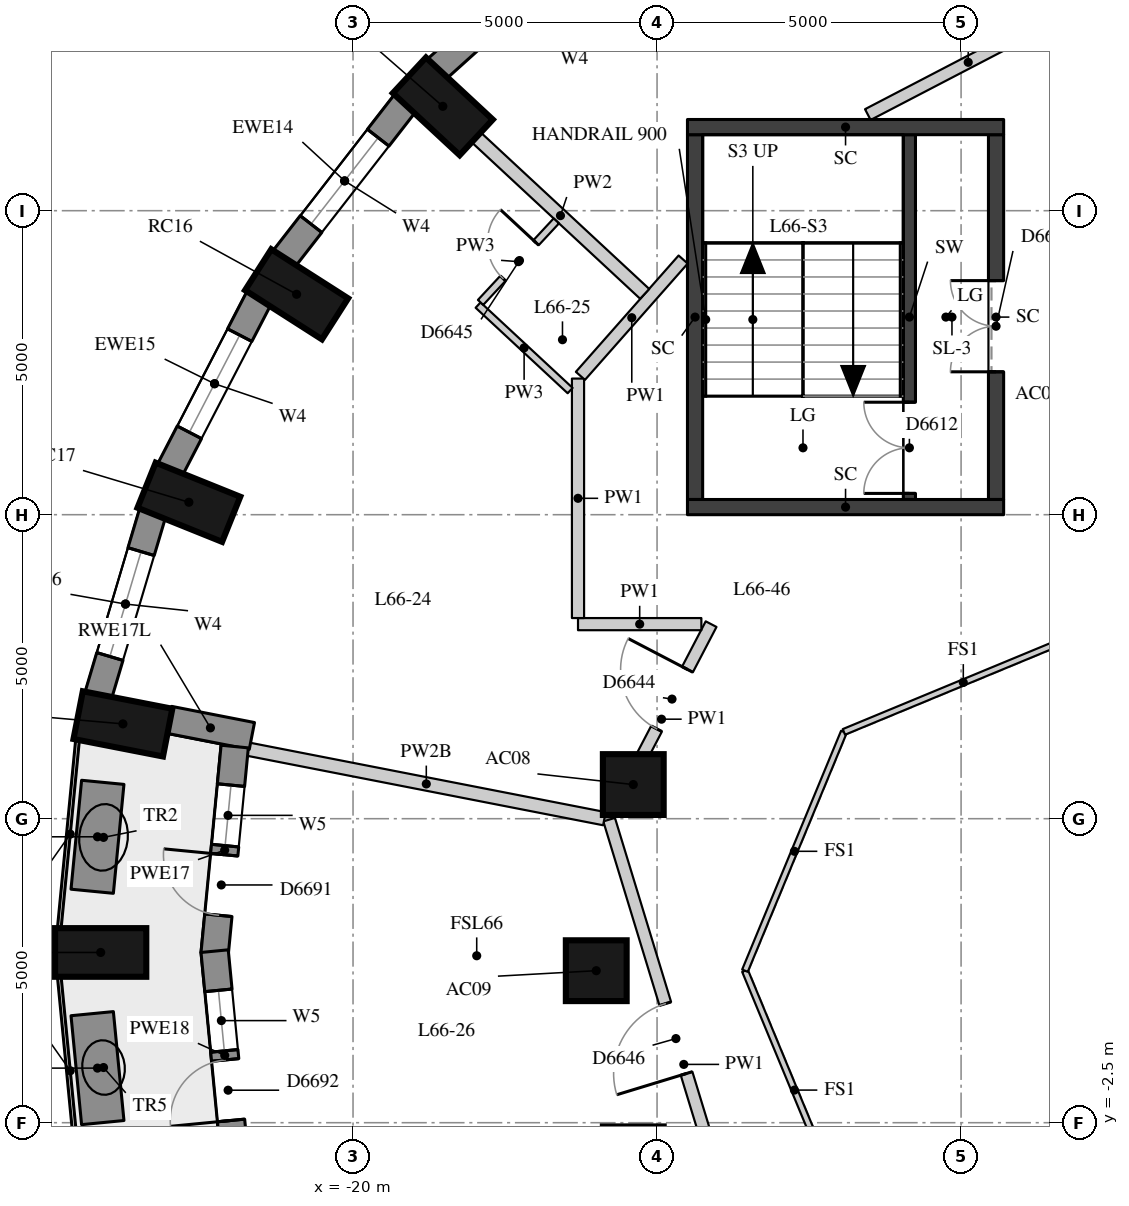
"""IFC4 building model, lengths in metres.
Left out: names, types, materials, properties, quantities, classifications, styles, units other than length and angle.
Written with IfcOpenShell. Run it as: python <this file> out.ifc"""

import sys

from ifc_helpers import new_model, si_unit, direction, frame, frame_2d, origin, origin_2d, place, context, subcontext, project, spatial, rectangle, extrude, element, fill, save


model = new_model("IFC4")
c1 = context("Model", 3, precision=1e-05, world=origin(), true_north=direction((0.0, 1.0)))
c2 = subcontext(c1, "Body", "Model", "MODEL_VIEW")
j1 = project(units=[si_unit("LENGTHUNIT", "METRE"), si_unit("PLANEANGLEUNIT", "RADIAN")], contexts=[c1])
p1 = place(None, origin())
s1 = spatial("IfcSite", under=j1, at=p1, CompositionType="ELEMENT")
p2 = place(p1, origin())
s2 = spatial("IfcBuilding", under=s1, at=p2, CompositionType="ELEMENT")
p3 = place(p2, frame((0.0, 0.0, 233.3)))
s3 = spatial("IfcBuildingStorey", under=s2, at=p3, CompositionType="ELEMENT", Elevation=233.3)
for number, where, z_axis, x_axis in (
    (1, (-18.523, 14.216, 0.0), (0.0, 0.0, 1.0), (-0.733, 0.681, 0.0)),
    (2, (-20.928, 11.125, 0.0), (0.0, 0.0, 1.0), (-0.843, 0.539, 0.0)),
    (3, (-22.7, 7.705, 0.0), (0.0, 0.0, 1.0), (-0.928, 0.374, 0.0)),
    (4, (-23.785, 4.06, 0.0), (0.0, 0.0, 1.0), (-0.981, 0.192, 0.0)),
    (5, (-24.15, 0.3, 0.0), (0.0, 0.0, 1.0), (-1.0, 0.0, 0.0)),
):
    element("IfcColumn", number, at=place(p3, frame(where, z_axis=z_axis, x_axis=x_axis)), inside=s3, PredefinedType="COLUMN", context=c2, shape_type="SweptSolid", body=[
        extrude(rectangle(XDim=1.5, YDim=0.8, at=origin_2d()), origin(), (0.0, 0.0, 1.0), 3.3),
    ])
for number, where, z_axis, x_axis in (
    (6, (-15.391, 3.062, 0.0), (0.0, 0.0, 1.0), (1.0, 0.0, 0.0)),
    (7, (-16.0, 0.0, 0.0), (0.0, 0.0, 1.0), (1.0, 0.0, 0.0)),
    (8, (-15.391, -3.062, 0.0), (0.0, 0.0, 1.0), (1.0, 0.0, 0.0)),
):
    element("IfcColumn", number, at=place(p3, frame(where, z_axis=z_axis, x_axis=x_axis)), inside=s3, PredefinedType="COLUMN", context=c2, shape_type="SweptSolid", body=[
        extrude(rectangle(XDim=1.0, YDim=1.0, at=origin_2d()), origin(), (0.0, 0.0, 1.0), 3.3),
    ])
p4 = place(p3, frame((-16.159, 17.047, 0.0), z_axis=(0.0, 0.0, 1.0), x_axis=(-0.743166014219, -0.669107073128, 0.0)))
e9 = element("IfcWall", 9, at=p4, inside=s3, PredefinedType="SOLIDWALL", context=c2, shape_type="SweptSolid", body=[
    extrude(rectangle(XDim=3.316, YDim=0.45, at=frame_2d((1.658, 0.0))), origin(), (0.0, 0.0, 1.0), 3.02),
])
p5 = place(p4, frame((0.758, 0.0, 0.4)))
e10 = element("IfcOpeningElement", 10, at=p5, cuts=e9, PredefinedType="OPENING", context=c2, shape_type="SweptSolid", body=[
    extrude(rectangle(XDim=1.8, YDim=1.75, at=frame_2d((0.9, 0.875))), frame((0.0, 0.235, 0.0), z_axis=(0.0, -1.0, 0.0), x_axis=(1.0, 0.0, 0.0)), (0.0, 0.0, 1.0), 0.47),
])
p6 = place(p3, frame((-19.142, 14.272, 0.0), z_axis=(0.0, 0.0, 1.0), x_axis=(-0.613862536705, -0.789412937587, 0.0)))
e11 = element("IfcWall", 11, at=p6, inside=s3, PredefinedType="SOLIDWALL", context=c2, shape_type="SweptSolid", body=[
    extrude(rectangle(XDim=3.247, YDim=0.45, at=frame_2d((1.624, 0.0))), origin(), (0.0, 0.0, 1.0), 3.02),
])
p7 = place(p6, frame((0.724, 0.0, 0.4)))
e12 = element("IfcOpeningElement", 12, at=p7, cuts=e11, PredefinedType="OPENING", context=c2, shape_type="SweptSolid", body=[
    extrude(rectangle(XDim=1.8, YDim=1.75, at=frame_2d((0.9, 0.875))), frame((0.0, 0.235, 0.0), z_axis=(0.0, -1.0, 0.0), x_axis=(1.0, 0.0, 0.0)), (0.0, 0.0, 1.0), 0.47),
])
p8 = place(p3, frame((-21.545, 11.068, 0.0), z_axis=(0.0, 0.0, 1.0), x_axis=(-0.459889857669, -0.887975967475, 0.0)))
e13 = element("IfcWall", 13, at=p8, inside=s3, PredefinedType="SOLIDWALL", context=c2, shape_type="SweptSolid", body=[
    extrude(rectangle(XDim=3.186, YDim=0.45, at=frame_2d((1.593, 0.0))), origin(), (0.0, 0.0, 1.0), 3.02),
])
p9 = place(p8, frame((0.693, 0.0, 0.4)))
e14 = element("IfcOpeningElement", 14, at=p9, cuts=e13, PredefinedType="OPENING", context=c2, shape_type="SweptSolid", body=[
    extrude(rectangle(XDim=1.8, YDim=1.75, at=frame_2d((0.9, 0.875))), frame((0.0, 0.235, 0.0), z_axis=(0.0, -1.0, 0.0), x_axis=(1.0, 0.0, 0.0)), (0.0, 0.0, 1.0), 0.47),
])
p10 = place(p3, frame((-23.294, 7.535, 0.0), z_axis=(0.0, 0.0, 1.0), x_axis=(-0.285263800865, -0.958449040855, 0.0)))
e15 = element("IfcWall", 15, at=p10, inside=s3, PredefinedType="SOLIDWALL", context=c2, shape_type="SweptSolid", body=[
    extrude(rectangle(XDim=3.139, YDim=0.45, at=frame_2d((1.57, 0.0))), origin(), (0.0, 0.0, 1.0), 3.02),
])
p11 = place(p10, frame((0.67, 0.0, 0.4)))
e16 = element("IfcOpeningElement", 16, at=p11, cuts=e15, PredefinedType="OPENING", context=c2, shape_type="SweptSolid", body=[
    extrude(rectangle(XDim=1.8, YDim=1.75, at=frame_2d((0.9, 0.875))), frame((0.0, 0.235, 0.0), z_axis=(0.0, -1.0, 0.0), x_axis=(1.0, 0.0, 0.0)), (0.0, 0.0, 1.0), 0.47),
])
p12 = place(p3, frame((-23.028, 4.127, 0.0), z_axis=(0.0, 0.0, 1.0), x_axis=(0.981468844755, -0.191621780535, 0.0)))
e17 = element("IfcWall", 17, at=p12, inside=s3, PredefinedType="SOLIDWALL", context=c2, shape_type="SweptSolid", body=[
    extrude(rectangle(XDim=1.39, YDim=0.45, at=frame_2d((0.695, 0.0))), origin(), (0.0, 0.0, 1.0), 2.57),
])
p13 = place(p3, frame((-21.946, 3.687, 0.0), z_axis=(0.0, 0.0, 1.0), x_axis=(-0.096467747711, -0.995336110895, 0.0)))
e18 = element("IfcWall", 18, at=p13, inside=s3, PredefinedType="SOLIDWALL", context=c2, shape_type="SweptSolid", body=[
    extrude(rectangle(XDim=3.424, YDim=0.45, at=frame_2d((1.712, 0.0))), origin(), (0.0, 0.0, 1.0), 3.02),
])
p14 = place(p13, frame((0.637, 0.0, 0.4)))
e19 = element("IfcOpeningElement", 19, at=p14, cuts=e18, PredefinedType="OPENING", context=c2, shape_type="SweptSolid", body=[
    extrude(rectangle(XDim=1.0, YDim=1.75, at=frame_2d((0.5, 0.875))), frame((0.0, 0.235, 0.0), z_axis=(0.0, -1.0, 0.0), x_axis=(1.0, 0.0, 0.0)), (0.0, 0.0, 1.0), 0.47),
])
p15 = place(p13, frame((1.787, 0.0, 0.0)))
e20 = element("IfcOpeningElement", 20, at=p15, cuts=e18, PredefinedType="OPENING", context=c2, shape_type="SweptSolid", body=[
    extrude(rectangle(XDim=1.0, YDim=2.15, at=frame_2d((0.5, 1.075))), frame((0.0, 0.235, 0.0), z_axis=(0.0, -1.0, 0.0), x_axis=(1.0, 0.0, 0.0)), (0.0, 0.0, 1.0), 0.47),
])
p16 = place(p3, frame((-22.276, 0.322, 0.0), z_axis=(0.0, 0.0, 1.0), x_axis=(0.096423819494, -0.995340367429, 0.0)))
e21 = element("IfcWall", 21, at=p16, inside=s3, PredefinedType="SOLIDWALL", context=c2, shape_type="SweptSolid", body=[
    extrude(rectangle(XDim=3.446, YDim=0.45, at=frame_2d((1.723, 0.0))), origin(), (0.0, 0.0, 1.0), 3.02),
])
p17 = place(p16, frame((0.648, 0.0, 0.4)))
e22 = element("IfcOpeningElement", 22, at=p17, cuts=e21, PredefinedType="OPENING", context=c2, shape_type="SweptSolid", body=[
    extrude(rectangle(XDim=1.0, YDim=1.75, at=frame_2d((0.5, 0.875))), frame((0.0, 0.235, 0.0), z_axis=(0.0, -1.0, 0.0), x_axis=(1.0, 0.0, 0.0)), (0.0, 0.0, 1.0), 0.47),
])
p18 = place(p16, frame((1.798, 0.0, 0.0)))
e23 = element("IfcOpeningElement", 23, at=p18, cuts=e21, PredefinedType="OPENING", context=c2, shape_type="SweptSolid", body=[
    extrude(rectangle(XDim=1.0, YDim=2.15, at=frame_2d((0.5, 1.075))), frame((0.0, 0.235, 0.0), z_axis=(0.0, -1.0, 0.0), x_axis=(1.0, 0.0, 0.0)), (0.0, 0.0, 1.0), 0.47),
])
for number, where, z_axis, x_axis in (
    (24, (-24.116, 3.098, 0.0), (0.0, 0.0, 1.0), (-0.097, -0.995, 0.0)),
    (25, (-24.29, -0.707, 0.0), (0.0, 0.0, 1.0), (0.097, -0.995, 0.0)),
):
    element("IfcWall", number, at=place(p3, frame(where, z_axis=z_axis, x_axis=x_axis)), inside=s3, PredefinedType="USERDEFINED", context=c2, shape_type="SweptSolid", body=[
        extrude(rectangle(XDim=1.8, YDim=0.7, at=frame_2d((0.9, 0.0))), origin(), (0.0, 0.0, 1.0), 0.75),
    ])
p19 = place(p3, frame((-10.85, 7.75, 0.0), z_axis=(0.0, 0.0, 1.0), x_axis=(0.0, 1.0, 0.0)))
e26 = element("IfcWall", 26, at=p19, inside=s3, PredefinedType="SHEAR", context=c2, shape_type="SweptSolid", body=[
    extrude(rectangle(XDim=6.0, YDim=0.2, at=frame_2d((3.0, 0.0))), origin(), (0.0, 0.0, 1.0), 3.02),
])
p20 = place(p19, frame((0.1, 0.0, 0.0)))
e27 = element("IfcOpeningElement", 27, at=p20, cuts=e26, PredefinedType="OPENING", context=c2, shape_type="SweptSolid", body=[
    extrude(rectangle(XDim=1.5, YDim=2.1, at=frame_2d((0.75, 1.05))), frame((0.0, 0.11, 0.0), z_axis=(0.0, -1.0, 0.0), x_axis=(1.0, 0.0, 0.0)), (0.0, 0.0, 1.0), 0.22),
])
p21 = place(p3, frame((-14.375, 7.75, -0.28), z_axis=(0.0, 0.0, 1.0), x_axis=(0.0, 1.0, 0.0)))
e28 = element("IfcWall", 28, at=p21, inside=s3, PredefinedType="SHEAR", context=c2, shape_type="SweptSolid", body=[
    extrude(rectangle(XDim=6.0, YDim=0.25, at=frame_2d((3.0, 0.0))), origin(), (0.0, 0.0, 1.0), 3.3),
])
p22 = place(p3, frame((-9.425, 7.75, -0.28), z_axis=(0.0, 0.0, 1.0), x_axis=(0.0, 1.0, 0.0)))
e29 = element("IfcWall", 29, at=p22, inside=s3, PredefinedType="SHEAR", context=c2, shape_type="SweptSolid", body=[
    extrude(rectangle(XDim=6.0, YDim=0.25, at=frame_2d((3.0, 0.0))), origin(), (0.0, 0.0, 1.0), 3.3),
])
p23 = place(p22, frame((2.1, 0.0, 0.28)))
e30 = element("IfcOpeningElement", 30, at=p23, cuts=e29, PredefinedType="OPENING", context=c2, shape_type="SweptSolid", body=[
    extrude(rectangle(XDim=1.5, YDim=2.1, at=frame_2d((0.75, 1.05))), frame((0.0, 0.135, 0.0), z_axis=(0.0, -1.0, 0.0), x_axis=(1.0, 0.0, 0.0)), (0.0, 0.0, 1.0), 0.27),
])
for number, where, z_axis, x_axis in (
    (31, (-14.5, 13.875, -0.28), (0.0, 0.0, 1.0), (1.0, 0.0, 0.0)),
    (32, (-14.5, 7.625, -0.28), (0.0, 0.0, 1.0), (1.0, 0.0, 0.0)),
):
    element("IfcWall", number, at=place(p3, frame(where, z_axis=z_axis, x_axis=x_axis)), inside=s3, PredefinedType="SHEAR", context=c2, shape_type="SweptSolid", body=[
        extrude(rectangle(XDim=5.2, YDim=0.25, at=frame_2d((2.6, 0.0))), origin(), (0.0, 0.0, 1.0), 3.3),
    ])
p24 = place(p3, frame((-11.534, 14.081, 0.0), z_axis=(0.0, 0.0, 1.0), x_axis=(0.886975089277, 0.461817270143, 0.0)))
e33 = element("IfcWall", 33, at=p24, inside=s3, PredefinedType="PARTITIONING", context=c2, shape_type="SweptSolid", body=[
    extrude(rectangle(XDim=3.723, YDim=0.2, at=frame_2d((1.861, 0.0))), origin(), (0.0, 0.0, 1.0), 3.02),
])
p25 = place(p3, frame((-13.333, -5.567, 0.0), z_axis=(0.0, 0.0, 1.0), x_axis=(-0.291732883234, 0.956499830026, 0.0)))
e34 = element("IfcWall", 34, at=p25, inside=s3, PredefinedType="PARTITIONING", context=c2, shape_type="SweptSolid", body=[
    extrude(rectangle(XDim=8.417, YDim=0.2, at=frame_2d((4.208, 0.0))), origin(), (0.0, 0.0, 1.0), 3.02),
])
p26 = place(p25, frame((4.053, 0.0, 0.0)))
e35 = element("IfcOpeningElement", 35, at=p26, cuts=e34, PredefinedType="OPENING", context=c2, shape_type="SweptSolid", body=[
    extrude(rectangle(XDim=1.2, YDim=2.1, at=frame_2d((0.6, 1.05))), frame((0.0, 0.11, 0.0), z_axis=(0.0, -1.0, 0.0), x_axis=(1.0, 0.0, 0.0)), (0.0, 0.0, 1.0), 0.22),
])
p27 = place(p3, frame((-15.742, 2.573, 0.0), z_axis=(0.0, 0.0, 1.0), x_axis=(0.462435860297, 0.886652736482, 0.0)))
e36 = element("IfcWall", 36, at=p27, inside=s3, PredefinedType="PARTITIONING", context=c2, shape_type="SweptSolid", body=[
    extrude(rectangle(XDim=3.526, YDim=0.2, at=frame_2d((1.763, 0.0))), origin(), (0.0, 0.0, 1.0), 3.02),
])
p28 = place(p27, frame((1.586, 0.0, 0.0)))
e37 = element("IfcOpeningElement", 37, at=p28, cuts=e36, PredefinedType="OPENING", context=c2, shape_type="SweptSolid", body=[
    extrude(rectangle(XDim=1.1, YDim=2.1, at=frame_2d((0.55, 1.05))), frame((0.0, 0.11, 0.0), z_axis=(0.0, -1.0, 0.0), x_axis=(1.0, 0.0, 0.0)), (0.0, 0.0, 1.0), 0.22),
])
p29 = place(p3, frame((-14.271, 5.7, 0.0), z_axis=(0.0, 0.0, 1.0), x_axis=(-1.0, 0.0, 0.0)))
e38 = element("IfcWall", 38, at=p29, inside=s3, PredefinedType="PARTITIONING", context=c2, shape_type="SweptSolid", body=[
    extrude(rectangle(XDim=2.029, YDim=0.2, at=frame_2d((1.014, 0.0))), origin(), (0.0, 0.0, 1.0), 3.02),
])
p30 = place(p3, frame((-16.3, 5.8, 0.0), z_axis=(0.0, 0.0, 1.0), x_axis=(0.0, 1.0, 0.0)))
e39 = element("IfcWall", 39, at=p30, inside=s3, PredefinedType="PARTITIONING", context=c2, shape_type="SweptSolid", body=[
    extrude(rectangle(XDim=3.939, YDim=0.2, at=frame_2d((1.969, 0.0))), origin(), (0.0, 0.0, 1.0), 3.02),
])
p31 = place(p3, frame((-16.26, 9.783, 0.0), z_axis=(0.0, 0.0, 1.0), x_axis=(0.66199168739, 0.74951117792, 0.0)))
e40 = element("IfcWall", 40, at=p31, inside=s3, PredefinedType="PARTITIONING", context=c2, shape_type="SweptSolid", body=[
    extrude(rectangle(XDim=2.552, YDim=0.2, at=frame_2d((1.276, 0.0))), origin(), (0.0, 0.0, 1.0), 3.02),
])
p32 = place(p3, frame((-17.974, 13.706, 0.0), z_axis=(0.0, 0.0, 1.0), x_axis=(0.732644022802, -0.680612030346, 0.0)))
e41 = element("IfcWall", 41, at=p32, inside=s3, PredefinedType="PARTITIONING", context=c2, shape_type="SweptSolid", body=[
    extrude(rectangle(XDim=3.782, YDim=0.22, at=frame_2d((1.891, 0.0))), origin(), (0.0, 0.0, 1.0), 3.02),
])
p33 = place(p3, frame((-21.724, 3.643, 0.0), z_axis=(0.0, 0.0, 1.0), x_axis=(0.981479525595, -0.191567066159, 0.0)))
e42 = element("IfcWall", 42, at=p33, inside=s3, PredefinedType="PARTITIONING", context=c2, shape_type="SweptSolid", body=[
    extrude(rectangle(XDim=5.968, YDim=0.22, at=frame_2d((2.984, 0.0))), origin(), (0.0, 0.0, 1.0), 2.57),
])
p34 = place(p3, frame((-16.429, 9.541, 0.0), z_axis=(0.0, 0.0, 1.0), x_axis=(-0.732625124054, 0.680632373315, 0.0)))
e43 = element("IfcWall", 43, at=p34, inside=s3, PredefinedType="PARTITIONING", context=c2, shape_type="SweptSolid", body=[
    extrude(rectangle(XDim=2.066, YDim=0.12, at=frame_2d((1.033, 0.0))), origin(), (0.0, 0.0, 1.0), 3.02),
])
p35 = place(p3, frame((-17.902, 10.991, 0.0), z_axis=(0.0, 0.0, 1.0), x_axis=(0.680681343043, 0.732579626548, 0.0)))
e44 = element("IfcWall", 44, at=p35, inside=s3, PredefinedType="PARTITIONING", context=c2, shape_type="SweptSolid", body=[
    extrude(rectangle(XDim=1.83, YDim=0.12, at=frame_2d((0.915, 0.0))), origin(), (0.0, 0.0, 1.0), 3.02),
])
p36 = place(p35, frame((0.54, 0.0, 0.0)))
e45 = element("IfcOpeningElement", 45, at=p36, cuts=e44, PredefinedType="OPENING", context=c2, shape_type="SweptSolid", body=[
    extrude(rectangle(XDim=0.8, YDim=2.1, at=frame_2d((0.4, 1.05))), frame((0.0, 0.07, 0.0), z_axis=(0.0, -1.0, 0.0), x_axis=(1.0, 0.0, 0.0)), (0.0, 0.0, 1.0), 0.14),
])
for number, where, z_axis, x_axis in (
    (46, (-11.927, -3.927, 0.0), (0.0, 0.0, 1.0), (-0.383, 0.924, 0.0)),
    (47, (-13.554, 0.0, 0.0), (0.0, 0.0, 1.0), (0.383, 0.924, 0.0)),
    (48, (-11.927, 3.927, 0.0), (0.0, 0.0, 1.0), (0.924, 0.383, 0.0)),
):
    element("IfcWall", number, at=place(p3, frame(where, z_axis=z_axis, x_axis=x_axis)), inside=s3, PredefinedType="PARTITIONING", context=c2, shape_type="SweptSolid", body=[
        extrude(rectangle(XDim=4.251, YDim=0.1, at=frame_2d((2.125, 0.0))), origin(), (0.0, 0.0, 1.0), 3.02),
    ])
p37 = place(p7, origin())
e49 = element("IfcWindow", 49, at=p37, inside=s3, PartitioningType="SINGLE_PANEL", PredefinedType="WINDOW", context=c2, shape_type="SweptSolid", body=[
    extrude(rectangle(XDim=1.8, YDim=1.75, at=frame_2d((0.9, 0.875))), frame((0.0, 0.035, 0.0), z_axis=(0.0, -1.0, 0.0), x_axis=(1.0, 0.0, 0.0)), (0.0, 0.0, 1.0), 0.06),
])
fill(e12, e49)
p38 = place(p9, origin())
e50 = element("IfcWindow", 50, at=p38, inside=s3, PartitioningType="SINGLE_PANEL", PredefinedType="WINDOW", context=c2, shape_type="SweptSolid", body=[
    extrude(rectangle(XDim=1.8, YDim=1.75, at=frame_2d((0.9, 0.875))), frame((0.0, 0.035, 0.0), z_axis=(0.0, -1.0, 0.0), x_axis=(1.0, 0.0, 0.0)), (0.0, 0.0, 1.0), 0.06),
])
fill(e14, e50)
p39 = place(p11, origin())
e51 = element("IfcWindow", 51, at=p39, inside=s3, PartitioningType="SINGLE_PANEL", PredefinedType="WINDOW", context=c2, shape_type="SweptSolid", body=[
    extrude(rectangle(XDim=1.8, YDim=1.75, at=frame_2d((0.9, 0.875))), frame((0.0, 0.035, 0.0), z_axis=(0.0, -1.0, 0.0), x_axis=(1.0, 0.0, 0.0)), (0.0, 0.0, 1.0), 0.06),
])
fill(e16, e51)
p40 = place(p14, origin())
e52 = element("IfcWindow", 52, at=p40, inside=s3, PartitioningType="SINGLE_PANEL", PredefinedType="WINDOW", context=c2, shape_type="SweptSolid", body=[
    extrude(rectangle(XDim=1.0, YDim=1.75, at=frame_2d((0.5, 0.875))), frame((0.0, 0.035, 0.0), z_axis=(0.0, -1.0, 0.0), x_axis=(1.0, 0.0, 0.0)), (0.0, 0.0, 1.0), 0.06),
])
fill(e19, e52)
p41 = place(p15, frame((1.0, 0.0, 0.0), z_axis=(0.0, 0.0, 1.0), x_axis=(-1.0, 0.0, 0.0)))
e53 = element("IfcDoor", 53, at=p41, inside=s3, OperationType="SINGLE_SWING_RIGHT", PredefinedType="DOOR", context=c2, shape_type="SweptSolid", body=[
    extrude(rectangle(XDim=1.0, YDim=2.15, at=frame_2d((0.5, 1.075))), frame((0.0, 0.075, 0.0), z_axis=(0.0, -1.0, 0.0), x_axis=(1.0, 0.0, 0.0)), (0.0, 0.0, 1.0), 0.05),
])
fill(e20, e53)
p42 = place(p17, origin())
e54 = element("IfcWindow", 54, at=p42, inside=s3, PartitioningType="SINGLE_PANEL", PredefinedType="WINDOW", context=c2, shape_type="SweptSolid", body=[
    extrude(rectangle(XDim=1.0, YDim=1.75, at=frame_2d((0.5, 0.875))), frame((0.0, 0.035, 0.0), z_axis=(0.0, -1.0, 0.0), x_axis=(1.0, 0.0, 0.0)), (0.0, 0.0, 1.0), 0.06),
])
fill(e22, e54)
p43 = place(p18, frame((1.0, 0.0, 0.0), z_axis=(0.0, 0.0, 1.0), x_axis=(-1.0, 0.0, 0.0)))
e55 = element("IfcDoor", 55, at=p43, inside=s3, OperationType="SINGLE_SWING_LEFT", PredefinedType="DOOR", context=c2, shape_type="SweptSolid", body=[
    extrude(rectangle(XDim=1.0, YDim=2.15, at=frame_2d((0.5, 1.075))), frame((0.0, 0.075, 0.0), z_axis=(0.0, -1.0, 0.0), x_axis=(1.0, 0.0, 0.0)), (0.0, 0.0, 1.0), 0.05),
])
fill(e23, e55)
p44 = place(p20, origin())
e56 = element("IfcDoor", 56, at=p44, inside=s3, OperationType="DOUBLE_DOOR_SINGLE_SWING", PredefinedType="DOOR", context=c2, shape_type="SweptSolid", body=[
    extrude(rectangle(XDim=1.5, YDim=2.1, at=frame_2d((0.75, 1.05))), frame((0.0, 0.025, 0.0), z_axis=(0.0, -1.0, 0.0), x_axis=(1.0, 0.0, 0.0)), (0.0, 0.0, 1.0), 0.05),
])
fill(e27, e56)
p45 = place(p23, origin())
e57 = element("IfcDoor", 57, at=p45, inside=s3, OperationType="DOUBLE_DOOR_SINGLE_SWING", PredefinedType="DOOR", context=c2, shape_type="SweptSolid", body=[
    extrude(rectangle(XDim=1.5, YDim=2.1, at=frame_2d((0.75, 1.05))), frame((0.0, 0.025, 0.0), z_axis=(0.0, -1.0, 0.0), x_axis=(1.0, 0.0, 0.0)), (0.0, 0.0, 1.0), 0.05),
])
fill(e30, e57)
p46 = place(p28, origin())
e58 = element("IfcDoor", 58, at=p46, inside=s3, OperationType="SINGLE_SWING_RIGHT", PredefinedType="DOOR", context=c2, shape_type="SweptSolid", body=[
    extrude(rectangle(XDim=1.1, YDim=2.1, at=frame_2d((0.55, 1.05))), frame((0.0, 0.025, 0.0), z_axis=(0.0, -1.0, 0.0), x_axis=(1.0, 0.0, 0.0)), (0.0, 0.0, 1.0), 0.05),
])
fill(e37, e58)
p47 = place(p36, origin())
e59 = element("IfcDoor", 59, at=p47, inside=s3, OperationType="SINGLE_SWING_RIGHT", PredefinedType="DOOR", context=c2, shape_type="SweptSolid", body=[
    extrude(rectangle(XDim=0.8, YDim=2.1, at=frame_2d((0.4, 1.05))), frame((0.0, 0.025, 0.0), z_axis=(0.0, -1.0, 0.0), x_axis=(1.0, 0.0, 0.0)), (0.0, 0.0, 1.0), 0.05),
])
fill(e45, e59)
p48 = place(p26, origin())
e60 = element("IfcDoor", 60, at=p48, inside=s3, OperationType="SINGLE_SWING_LEFT", PredefinedType="DOOR", context=c2, shape_type="SweptSolid", body=[
    extrude(rectangle(XDim=1.2, YDim=2.1, at=frame_2d((0.6, 1.05))), frame((0.0, 0.025, 0.0), z_axis=(0.0, -1.0, 0.0), x_axis=(1.0, 0.0, 0.0)), (0.0, 0.0, 1.0), 0.05),
])
fill(e35, e60)
save(model, sys.argv[1])
